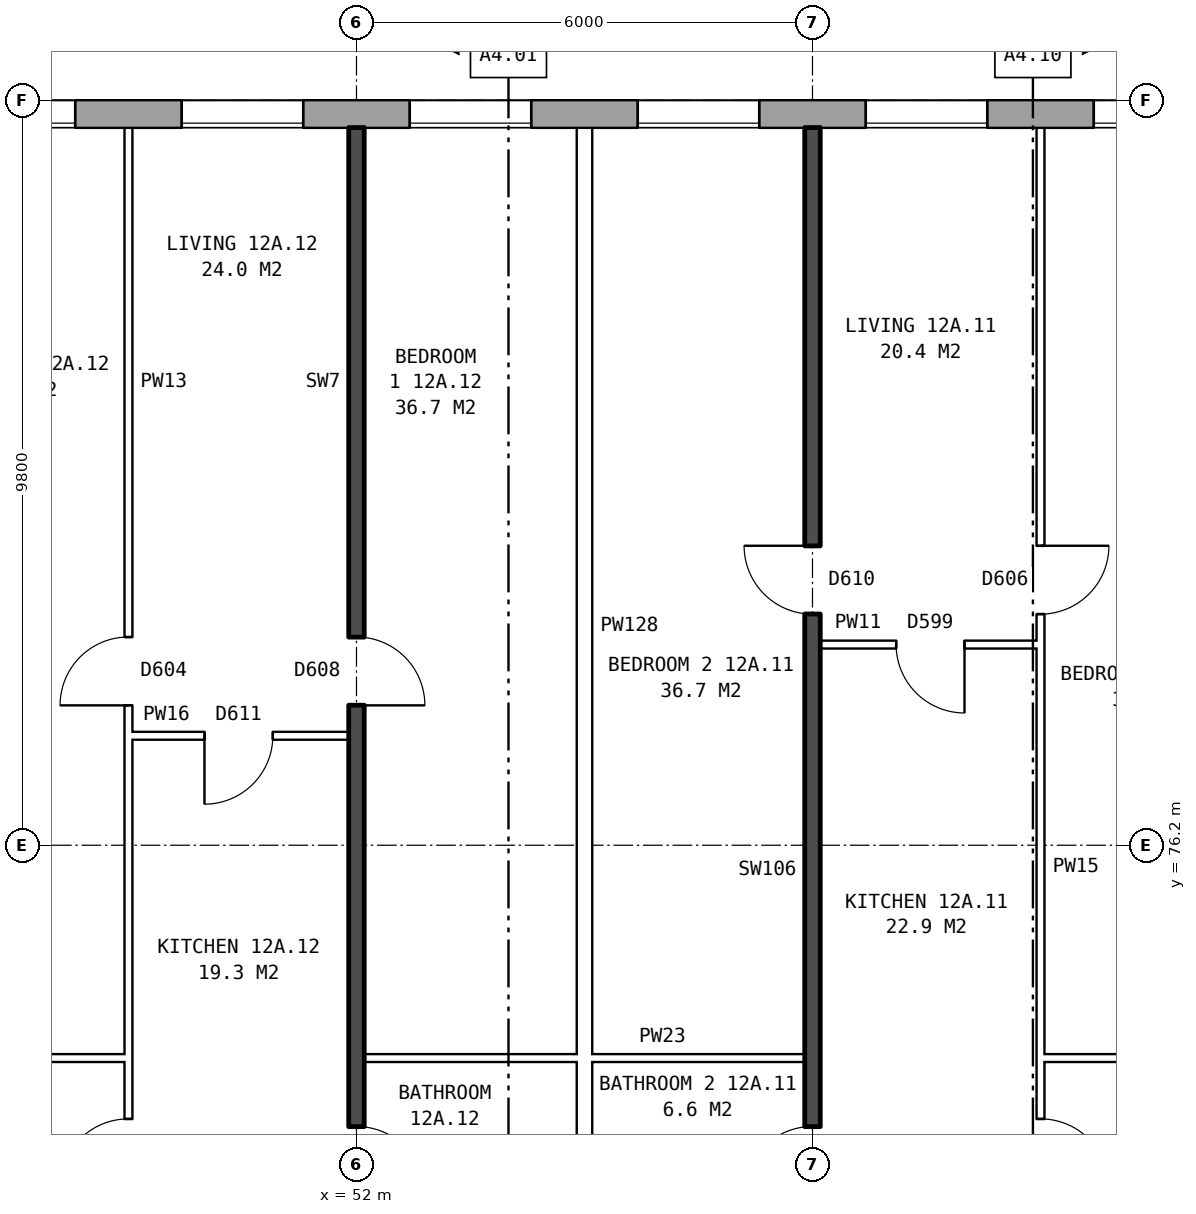
"""IFC4 building model, lengths in metres.
Left out: names, types, materials, properties, quantities, classifications, styles, units other than length and angle.
Written with IfcOpenShell. Run it as: python <this file> out.ifc"""

import sys

from ifc_helpers import new_model, si_unit, direction, frame, frame_2d, origin, place, context, subcontext, project, spatial, rectangle, extrude, element, fill, save


model = new_model("IFC4")
c1 = context("Model", 3, precision=1e-05, world=origin(), true_north=direction((0.0, 1.0)))
c2 = subcontext(c1, "Body", "Model", "MODEL_VIEW")
j1 = project(units=[si_unit("LENGTHUNIT", "METRE"), si_unit("PLANEANGLEUNIT", "RADIAN")], contexts=[c1])
p1 = place(None, origin())
s1 = spatial("IfcSite", under=j1, at=p1, CompositionType="ELEMENT")
p2 = place(p1, origin())
s2 = spatial("IfcBuilding", under=s1, at=p2, CompositionType="ELEMENT")
p3 = place(p2, frame((0.0, 0.0, 47.4)))
s3 = spatial("IfcBuildingStorey", under=s2, at=p3, CompositionType="ELEMENT", Elevation=47.4)
p4 = place(p3, frame((72.925, 85.82, 0.0), z_axis=(0.0, 0.0, 1.0), x_axis=(-1.0, 0.0, 0.0)))
e1 = element("IfcWall", 1, at=p4, inside=s3, PredefinedType="STANDARD", context=c2, shape_type="SweptSolid", body=[
    extrude(rectangle(XDim=48.351, YDim=0.36, at=frame_2d((24.175, 0.0))), origin(), (0.0, 0.0, 1.0), 2.85),
])
p5 = place(p4, frame((0.625, 0.0, 0.8)))
e2 = element("IfcOpeningElement", 2, at=p5, cuts=e1, PredefinedType="OPENING", context=c2, shape_type="SweptSolid", body=[
    extrude(rectangle(XDim=1.6, YDim=1.8, at=frame_2d((0.8, 0.9))), frame((0.0, 0.19, 0.0), z_axis=(0.0, -1.0, 0.0), x_axis=(1.0, 0.0, 0.0)), (0.0, 0.0, 1.0), 0.38),
])
p6 = place(p4, frame((3.125, 0.0, 1.7)))
e3 = element("IfcOpeningElement", 3, at=p6, cuts=e1, PredefinedType="OPENING", context=c2, shape_type="SweptSolid", body=[
    extrude(rectangle(XDim=0.6, YDim=0.9, at=frame_2d((0.3, 0.45))), frame((0.0, 0.19, 0.0), z_axis=(0.0, -1.0, 0.0), x_axis=(1.0, 0.0, 0.0)), (0.0, 0.0, 1.0), 0.38),
])
p7 = place(p4, frame((6.625, 0.0, 0.8)))
e4 = element("IfcOpeningElement", 4, at=p7, cuts=e1, PredefinedType="OPENING", context=c2, shape_type="SweptSolid", body=[
    extrude(rectangle(XDim=1.6, YDim=1.8, at=frame_2d((0.8, 0.9))), frame((0.0, 0.19, 0.0), z_axis=(0.0, -1.0, 0.0), x_axis=(1.0, 0.0, 0.0)), (0.0, 0.0, 1.0), 0.38),
])
p8 = place(p4, frame((9.625, 0.0, 0.8)))
e5 = element("IfcOpeningElement", 5, at=p8, cuts=e1, PredefinedType="OPENING", context=c2, shape_type="SweptSolid", body=[
    extrude(rectangle(XDim=1.6, YDim=1.8, at=frame_2d((0.8, 0.9))), frame((0.0, 0.19, 0.0), z_axis=(0.0, -1.0, 0.0), x_axis=(1.0, 0.0, 0.0)), (0.0, 0.0, 1.0), 0.38),
])
p9 = place(p4, frame((12.625, 0.0, 0.8)))
e6 = element("IfcOpeningElement", 6, at=p9, cuts=e1, PredefinedType="OPENING", context=c2, shape_type="SweptSolid", body=[
    extrude(rectangle(XDim=1.6, YDim=1.8, at=frame_2d((0.8, 0.9))), frame((0.0, 0.19, 0.0), z_axis=(0.0, -1.0, 0.0), x_axis=(1.0, 0.0, 0.0)), (0.0, 0.0, 1.0), 0.38),
])
p10 = place(p4, frame((15.625, 0.0, 0.8)))
e7 = element("IfcOpeningElement", 7, at=p10, cuts=e1, PredefinedType="OPENING", context=c2, shape_type="SweptSolid", body=[
    extrude(rectangle(XDim=1.6, YDim=1.8, at=frame_2d((0.8, 0.9))), frame((0.0, 0.19, 0.0), z_axis=(0.0, -1.0, 0.0), x_axis=(1.0, 0.0, 0.0)), (0.0, 0.0, 1.0), 0.38),
])
p11 = place(p4, frame((18.625, 0.0, 0.8)))
e8 = element("IfcOpeningElement", 8, at=p11, cuts=e1, PredefinedType="OPENING", context=c2, shape_type="SweptSolid", body=[
    extrude(rectangle(XDim=1.6, YDim=1.8, at=frame_2d((0.8, 0.9))), frame((0.0, 0.19, 0.0), z_axis=(0.0, -1.0, 0.0), x_axis=(1.0, 0.0, 0.0)), (0.0, 0.0, 1.0), 0.38),
])
p12 = place(p4, frame((21.625, 0.0, 0.8)))
e9 = element("IfcOpeningElement", 9, at=p12, cuts=e1, PredefinedType="OPENING", context=c2, shape_type="SweptSolid", body=[
    extrude(rectangle(XDim=1.6, YDim=1.8, at=frame_2d((0.8, 0.9))), frame((0.0, 0.19, 0.0), z_axis=(0.0, -1.0, 0.0), x_axis=(1.0, 0.0, 0.0)), (0.0, 0.0, 1.0), 0.38),
])
p13 = place(p4, frame((24.625, 0.0, 0.8)))
e10 = element("IfcOpeningElement", 10, at=p13, cuts=e1, PredefinedType="OPENING", context=c2, shape_type="SweptSolid", body=[
    extrude(rectangle(XDim=1.6, YDim=1.8, at=frame_2d((0.8, 0.9))), frame((0.0, 0.19, 0.0), z_axis=(0.0, -1.0, 0.0), x_axis=(1.0, 0.0, 0.0)), (0.0, 0.0, 1.0), 0.38),
])
p14 = place(p4, frame((27.625, 0.0, 0.8)))
e11 = element("IfcOpeningElement", 11, at=p14, cuts=e1, PredefinedType="OPENING", context=c2, shape_type="SweptSolid", body=[
    extrude(rectangle(XDim=1.6, YDim=1.8, at=frame_2d((0.8, 0.9))), frame((0.0, 0.19, 0.0), z_axis=(0.0, -1.0, 0.0), x_axis=(1.0, 0.0, 0.0)), (0.0, 0.0, 1.0), 0.38),
])
p15 = place(p4, frame((30.625, 0.0, 0.8)))
e12 = element("IfcOpeningElement", 12, at=p15, cuts=e1, PredefinedType="OPENING", context=c2, shape_type="SweptSolid", body=[
    extrude(rectangle(XDim=1.6, YDim=1.8, at=frame_2d((0.8, 0.9))), frame((0.0, 0.19, 0.0), z_axis=(0.0, -1.0, 0.0), x_axis=(1.0, 0.0, 0.0)), (0.0, 0.0, 1.0), 0.38),
])
p16 = place(p4, frame((33.625, 0.0, 0.8)))
e13 = element("IfcOpeningElement", 13, at=p16, cuts=e1, PredefinedType="OPENING", context=c2, shape_type="SweptSolid", body=[
    extrude(rectangle(XDim=1.6, YDim=1.8, at=frame_2d((0.8, 0.9))), frame((0.0, 0.19, 0.0), z_axis=(0.0, -1.0, 0.0), x_axis=(1.0, 0.0, 0.0)), (0.0, 0.0, 1.0), 0.38),
])
p17 = place(p4, frame((36.625, 0.0, 0.8)))
e14 = element("IfcOpeningElement", 14, at=p17, cuts=e1, PredefinedType="OPENING", context=c2, shape_type="SweptSolid", body=[
    extrude(rectangle(XDim=1.6, YDim=1.8, at=frame_2d((0.8, 0.9))), frame((0.0, 0.19, 0.0), z_axis=(0.0, -1.0, 0.0), x_axis=(1.0, 0.0, 0.0)), (0.0, 0.0, 1.0), 0.38),
])
p18 = place(p4, frame((39.625, 0.0, 0.8)))
e15 = element("IfcOpeningElement", 15, at=p18, cuts=e1, PredefinedType="OPENING", context=c2, shape_type="SweptSolid", body=[
    extrude(rectangle(XDim=1.6, YDim=1.8, at=frame_2d((0.8, 0.9))), frame((0.0, 0.19, 0.0), z_axis=(0.0, -1.0, 0.0), x_axis=(1.0, 0.0, 0.0)), (0.0, 0.0, 1.0), 0.38),
])
p19 = place(p4, frame((41.525, 0.0, 0.8)))
e16 = element("IfcOpeningElement", 16, at=p19, cuts=e1, PredefinedType="OPENING", context=c2, shape_type="SweptSolid", body=[
    extrude(rectangle(XDim=1.2, YDim=1.2, at=frame_2d((0.6, 0.6))), frame((0.0, 0.19, 0.0), z_axis=(0.0, -1.0, 0.0), x_axis=(1.0, 0.0, 0.0)), (0.0, 0.0, 1.0), 0.38),
])
p20 = place(p4, frame((45.625, 0.0, 0.8)))
e17 = element("IfcOpeningElement", 17, at=p20, cuts=e1, PredefinedType="OPENING", context=c2, shape_type="SweptSolid", body=[
    extrude(rectangle(XDim=1.6, YDim=1.8, at=frame_2d((0.8, 0.9))), frame((0.0, 0.19, 0.0), z_axis=(0.0, -1.0, 0.0), x_axis=(1.0, 0.0, 0.0)), (0.0, 0.0, 1.0), 0.38),
])
p21 = place(p4, frame((5.225, 0.0, 0.8)))
e18 = element("IfcOpeningElement", 18, at=p21, cuts=e1, PredefinedType="OPENING", context=c2, shape_type="SweptSolid", body=[
    extrude(rectangle(XDim=1.0, YDim=0.9, at=frame_2d((0.5, 0.45))), frame((0.0, 0.19, 0.0), z_axis=(0.0, -1.0, 0.0), x_axis=(1.0, 0.0, 0.0)), (0.0, 0.0, 1.0), 0.38),
])
p22 = place(p3, frame((46.1, 73.4, 0.0), z_axis=(0.0, 0.0, 1.0), x_axis=(1.0, 0.0, 0.0)))
e19 = element("IfcWall", 19, at=p22, inside=s3, PredefinedType="PARTITIONING", context=c2, shape_type="SweptSolid", body=[
    extrude(rectangle(XDim=2.9, YDim=0.1, at=frame_2d((1.45, 0.0))), origin(), (0.0, 0.0, 1.0), 2.85),
])
p23 = place(p3, frame((52.1, 73.4, 0.0), z_axis=(0.0, 0.0, 1.0), x_axis=(1.0, 0.0, 0.0)))
e20 = element("IfcWall", 20, at=p23, inside=s3, PredefinedType="PARTITIONING", context=c2, shape_type="SweptSolid", body=[
    extrude(rectangle(XDim=5.8, YDim=0.1, at=frame_2d((2.9, 0.0))), origin(), (0.0, 0.0, 1.0), 2.85),
])
p24 = place(p3, frame((61.0, 73.4, 0.0), z_axis=(0.0, 0.0, 1.0), x_axis=(1.0, 0.0, 0.0)))
e21 = element("IfcWall", 21, at=p24, inside=s3, PredefinedType="PARTITIONING", context=c2, shape_type="SweptSolid", body=[
    extrude(rectangle(XDim=2.64, YDim=0.1, at=frame_2d((1.32, 0.0))), origin(), (0.0, 0.0, 1.0), 2.85),
])
p25 = place(p3, frame((49.0, 77.64, 0.0), z_axis=(0.0, 0.0, 1.0), x_axis=(1.0, 0.0, 0.0)))
e22 = element("IfcWall", 22, at=p25, inside=s3, PredefinedType="PARTITIONING", context=c2, shape_type="SweptSolid", body=[
    extrude(rectangle(XDim=2.9, YDim=0.1, at=frame_2d((1.45, 0.0))), origin(), (0.0, 0.0, 1.0), 2.85),
])
p26 = place(p25, frame((1.0, 0.0, 0.0)))
e23 = element("IfcOpeningElement", 23, at=p26, cuts=e22, PredefinedType="OPENING", context=c2, shape_type="SweptSolid", body=[
    extrude(rectangle(XDim=0.9, YDim=2.1, at=frame_2d((0.45, 1.05))), frame((0.0, 0.06, 0.0), z_axis=(0.0, -1.0, 0.0), x_axis=(1.0, 0.0, 0.0)), (0.0, 0.0, 1.0), 0.12),
])
p27 = place(p3, frame((58.1, 78.84, 0.0), z_axis=(0.0, 0.0, 1.0), x_axis=(1.0, 0.0, 0.0)))
e24 = element("IfcWall", 24, at=p27, inside=s3, PredefinedType="PARTITIONING", context=c2, shape_type="SweptSolid", body=[
    extrude(rectangle(XDim=2.9, YDim=0.1, at=frame_2d((1.45, 0.0))), origin(), (0.0, 0.0, 1.0), 2.85),
])
p28 = place(p27, frame((1.0, 0.0, 0.0)))
e25 = element("IfcOpeningElement", 25, at=p28, cuts=e24, PredefinedType="OPENING", context=c2, shape_type="SweptSolid", body=[
    extrude(rectangle(XDim=0.9, YDim=2.1, at=frame_2d((0.45, 1.05))), frame((0.0, 0.06, 0.0), z_axis=(0.0, -1.0, 0.0), x_axis=(1.0, 0.0, 0.0)), (0.0, 0.0, 1.0), 0.12),
])
p29 = place(p3, frame((49.0, 71.3, 0.0), z_axis=(0.0, 0.0, 1.0), x_axis=(0.0, 1.0, 0.0)))
e26 = element("IfcWall", 26, at=p29, inside=s3, PredefinedType="PARTITIONING", context=c2, shape_type="SweptSolid", body=[
    extrude(rectangle(XDim=14.34, YDim=0.1, at=frame_2d((7.17, 0.0))), origin(), (0.0, 0.0, 1.0), 2.85),
])
p30 = place(p29, frame((6.74, 0.0, 0.0)))
e27 = element("IfcOpeningElement", 27, at=p30, cuts=e26, PredefinedType="OPENING", context=c2, shape_type="SweptSolid", body=[
    extrude(rectangle(XDim=0.9, YDim=2.1, at=frame_2d((0.45, 1.05))), frame((0.0, 0.06, 0.0), z_axis=(0.0, -1.0, 0.0), x_axis=(1.0, 0.0, 0.0)), (0.0, 0.0, 1.0), 0.12),
])
p31 = place(p29, frame((0.4, 0.0, 0.0)))
e28 = element("IfcOpeningElement", 28, at=p31, cuts=e26, PredefinedType="OPENING", context=c2, shape_type="SweptSolid", body=[
    extrude(rectangle(XDim=0.9, YDim=2.1, at=frame_2d((0.45, 1.05))), frame((0.0, 0.06, 0.0), z_axis=(0.0, -1.0, 0.0), x_axis=(1.0, 0.0, 0.0)), (0.0, 0.0, 1.0), 0.12),
])
p32 = place(p3, frame((52.0, 71.2, 0.0), z_axis=(0.0, 0.0, 1.0), x_axis=(0.0, 1.0, 0.0)))
e29 = element("IfcWall", 29, at=p32, inside=s3, PredefinedType="SOLIDWALL", context=c2, shape_type="SweptSolid", body=[
    extrude(rectangle(XDim=14.44, YDim=0.2, at=frame_2d((7.22, 0.0))), origin(), (0.0, 0.0, 1.0), 2.85),
])
p33 = place(p32, frame((6.84, 0.0, 0.0)))
e30 = element("IfcOpeningElement", 30, at=p33, cuts=e29, PredefinedType="OPENING", context=c2, shape_type="SweptSolid", body=[
    extrude(rectangle(XDim=0.9, YDim=2.1, at=frame_2d((0.45, 1.05))), frame((0.0, 0.11, 0.0), z_axis=(0.0, -1.0, 0.0), x_axis=(1.0, 0.0, 0.0)), (0.0, 0.0, 1.0), 0.22),
])
p34 = place(p32, frame((0.4, 0.0, 0.0)))
e31 = element("IfcOpeningElement", 31, at=p34, cuts=e29, PredefinedType="OPENING", context=c2, shape_type="SweptSolid", body=[
    extrude(rectangle(XDim=0.9, YDim=2.1, at=frame_2d((0.45, 1.05))), frame((0.0, 0.11, 0.0), z_axis=(0.0, -1.0, 0.0), x_axis=(1.0, 0.0, 0.0)), (0.0, 0.0, 1.0), 0.22),
])
p35 = place(p3, frame((55.0, 71.3, 0.0), z_axis=(0.0, 0.0, 1.0), x_axis=(0.0, 1.0, 0.0)))
e32 = element("IfcWall", 32, at=p35, inside=s3, PredefinedType="PARTITIONING", context=c2, shape_type="SweptSolid", body=[
    extrude(rectangle(XDim=14.34, YDim=0.2, at=frame_2d((7.17, 0.0))), origin(), (0.0, 0.0, 1.0), 2.85),
])
p36 = place(p3, frame((58.0, 71.2, 0.0), z_axis=(0.0, 0.0, 1.0), x_axis=(0.0, 1.0, 0.0)))
e33 = element("IfcWall", 33, at=p36, inside=s3, PredefinedType="SOLIDWALL", context=c2, shape_type="SweptSolid", body=[
    extrude(rectangle(XDim=14.44, YDim=0.2, at=frame_2d((7.22, 0.0))), origin(), (0.0, 0.0, 1.0), 2.85),
])
p37 = place(p36, frame((8.04, 0.0, 0.0)))
e34 = element("IfcOpeningElement", 34, at=p37, cuts=e33, PredefinedType="OPENING", context=c2, shape_type="SweptSolid", body=[
    extrude(rectangle(XDim=0.9, YDim=2.1, at=frame_2d((0.45, 1.05))), frame((0.0, 0.11, 0.0), z_axis=(0.0, -1.0, 0.0), x_axis=(1.0, 0.0, 0.0)), (0.0, 0.0, 1.0), 0.22),
])
p38 = place(p36, frame((0.4, 0.0, 0.0)))
e35 = element("IfcOpeningElement", 35, at=p38, cuts=e33, PredefinedType="OPENING", context=c2, shape_type="SweptSolid", body=[
    extrude(rectangle(XDim=0.9, YDim=2.1, at=frame_2d((0.45, 1.05))), frame((0.0, 0.11, 0.0), z_axis=(0.0, -1.0, 0.0), x_axis=(1.0, 0.0, 0.0)), (0.0, 0.0, 1.0), 0.22),
])
p39 = place(p3, frame((61.0, 71.3, 0.0), z_axis=(0.0, 0.0, 1.0), x_axis=(0.0, 1.0, 0.0)))
e36 = element("IfcWall", 36, at=p39, inside=s3, PredefinedType="PARTITIONING", context=c2, shape_type="SweptSolid", body=[
    extrude(rectangle(XDim=14.34, YDim=0.1, at=frame_2d((7.17, 0.0))), origin(), (0.0, 0.0, 1.0), 2.85),
])
p40 = place(p39, frame((7.94, 0.0, 0.0)))
e37 = element("IfcOpeningElement", 37, at=p40, cuts=e36, PredefinedType="OPENING", context=c2, shape_type="SweptSolid", body=[
    extrude(rectangle(XDim=0.9, YDim=2.1, at=frame_2d((0.45, 1.05))), frame((0.0, 0.06, 0.0), z_axis=(0.0, -1.0, 0.0), x_axis=(1.0, 0.0, 0.0)), (0.0, 0.0, 1.0), 0.12),
])
p41 = place(p39, frame((0.4, 0.0, 0.0)))
e38 = element("IfcOpeningElement", 38, at=p41, cuts=e36, PredefinedType="OPENING", context=c2, shape_type="SweptSolid", body=[
    extrude(rectangle(XDim=0.9, YDim=2.1, at=frame_2d((0.45, 1.05))), frame((0.0, 0.06, 0.0), z_axis=(0.0, -1.0, 0.0), x_axis=(1.0, 0.0, 0.0)), (0.0, 0.0, 1.0), 0.12),
])
p42 = place(p8, origin())
e39 = element("IfcWindow", 39, at=p42, inside=s3, PartitioningType="SINGLE_PANEL", PredefinedType="WINDOW", context=c2, shape_type="SweptSolid", body=[
    extrude(rectangle(XDim=1.6, YDim=1.8, at=frame_2d((0.8, 0.9))), frame((0.0, 0.15, 0.0), z_axis=(0.0, -1.0, 0.0), x_axis=(1.0, 0.0, 0.0)), (0.0, 0.0, 1.0), 0.06),
])
fill(e5, e39)
p43 = place(p9, origin())
e40 = element("IfcWindow", 40, at=p43, inside=s3, PartitioningType="SINGLE_PANEL", PredefinedType="WINDOW", context=c2, shape_type="SweptSolid", body=[
    extrude(rectangle(XDim=1.6, YDim=1.8, at=frame_2d((0.8, 0.9))), frame((0.0, 0.15, 0.0), z_axis=(0.0, -1.0, 0.0), x_axis=(1.0, 0.0, 0.0)), (0.0, 0.0, 1.0), 0.06),
])
fill(e6, e40)
p44 = place(p10, origin())
e41 = element("IfcWindow", 41, at=p44, inside=s3, PartitioningType="SINGLE_PANEL", PredefinedType="WINDOW", context=c2, shape_type="SweptSolid", body=[
    extrude(rectangle(XDim=1.6, YDim=1.8, at=frame_2d((0.8, 0.9))), frame((0.0, 0.15, 0.0), z_axis=(0.0, -1.0, 0.0), x_axis=(1.0, 0.0, 0.0)), (0.0, 0.0, 1.0), 0.06),
])
fill(e7, e41)
p45 = place(p11, origin())
e42 = element("IfcWindow", 42, at=p45, inside=s3, PartitioningType="SINGLE_PANEL", PredefinedType="WINDOW", context=c2, shape_type="SweptSolid", body=[
    extrude(rectangle(XDim=1.6, YDim=1.8, at=frame_2d((0.8, 0.9))), frame((0.0, 0.15, 0.0), z_axis=(0.0, -1.0, 0.0), x_axis=(1.0, 0.0, 0.0)), (0.0, 0.0, 1.0), 0.06),
])
fill(e8, e42)
p46 = place(p12, origin())
e43 = element("IfcWindow", 43, at=p46, inside=s3, PartitioningType="SINGLE_PANEL", PredefinedType="WINDOW", context=c2, shape_type="SweptSolid", body=[
    extrude(rectangle(XDim=1.6, YDim=1.8, at=frame_2d((0.8, 0.9))), frame((0.0, 0.15, 0.0), z_axis=(0.0, -1.0, 0.0), x_axis=(1.0, 0.0, 0.0)), (0.0, 0.0, 1.0), 0.06),
])
fill(e9, e43)
p47 = place(p13, origin())
e44 = element("IfcWindow", 44, at=p47, inside=s3, PartitioningType="SINGLE_PANEL", PredefinedType="WINDOW", context=c2, shape_type="SweptSolid", body=[
    extrude(rectangle(XDim=1.6, YDim=1.8, at=frame_2d((0.8, 0.9))), frame((0.0, 0.15, 0.0), z_axis=(0.0, -1.0, 0.0), x_axis=(1.0, 0.0, 0.0)), (0.0, 0.0, 1.0), 0.06),
])
fill(e10, e44)
p48 = place(p40, frame((0.9, 0.0, 0.0), z_axis=(0.0, 0.0, 1.0), x_axis=(-1.0, 0.0, 0.0)))
e45 = element("IfcDoor", 45, at=p48, inside=s3, OperationType="SINGLE_SWING_LEFT", PredefinedType="DOOR", context=c2, shape_type="SweptSolid", body=[
    extrude(rectangle(XDim=0.9, YDim=2.1, at=frame_2d((0.45, 1.05))), frame((0.0, 0.025, 0.0), z_axis=(0.0, -1.0, 0.0), x_axis=(1.0, 0.0, 0.0)), (0.0, 0.0, 1.0), 0.05),
])
fill(e37, e45)
p49 = place(p37, origin())
e46 = element("IfcDoor", 46, at=p49, inside=s3, OperationType="SINGLE_SWING_RIGHT", PredefinedType="DOOR", context=c2, shape_type="SweptSolid", body=[
    extrude(rectangle(XDim=0.9, YDim=2.1, at=frame_2d((0.45, 1.05))), frame((0.0, 0.025, 0.0), z_axis=(0.0, -1.0, 0.0), x_axis=(1.0, 0.0, 0.0)), (0.0, 0.0, 1.0), 0.05),
])
fill(e34, e46)
p50 = place(p28, frame((0.9, 0.0, 0.0), z_axis=(0.0, 0.0, 1.0), x_axis=(-1.0, 0.0, 0.0)))
e47 = element("IfcDoor", 47, at=p50, inside=s3, OperationType="SINGLE_SWING_LEFT", PredefinedType="DOOR", context=c2, shape_type="SweptSolid", body=[
    extrude(rectangle(XDim=0.9, YDim=2.1, at=frame_2d((0.45, 1.05))), frame((0.0, 0.025, 0.0), z_axis=(0.0, -1.0, 0.0), x_axis=(1.0, 0.0, 0.0)), (0.0, 0.0, 1.0), 0.05),
])
fill(e25, e47)
p51 = place(p41, frame((0.9, 0.0, 0.0), z_axis=(0.0, 0.0, 1.0), x_axis=(-1.0, 0.0, 0.0)))
e48 = element("IfcDoor", 48, at=p51, inside=s3, OperationType="SINGLE_SWING_RIGHT", PredefinedType="DOOR", context=c2, shape_type="SweptSolid", body=[
    extrude(rectangle(XDim=0.9, YDim=2.1, at=frame_2d((0.45, 1.05))), frame((0.0, 0.025, 0.0), z_axis=(0.0, -1.0, 0.0), x_axis=(1.0, 0.0, 0.0)), (0.0, 0.0, 1.0), 0.05),
])
fill(e38, e48)
p52 = place(p38, origin())
e49 = element("IfcDoor", 49, at=p52, inside=s3, OperationType="SINGLE_SWING_LEFT", PredefinedType="DOOR", context=c2, shape_type="SweptSolid", body=[
    extrude(rectangle(XDim=0.9, YDim=2.1, at=frame_2d((0.45, 1.05))), frame((0.0, 0.025, 0.0), z_axis=(0.0, -1.0, 0.0), x_axis=(1.0, 0.0, 0.0)), (0.0, 0.0, 1.0), 0.05),
])
fill(e35, e49)
p53 = place(p33, frame((0.9, 0.0, 0.0), z_axis=(0.0, 0.0, 1.0), x_axis=(-1.0, 0.0, 0.0)))
e50 = element("IfcDoor", 50, at=p53, inside=s3, OperationType="SINGLE_SWING_RIGHT", PredefinedType="DOOR", context=c2, shape_type="SweptSolid", body=[
    extrude(rectangle(XDim=0.9, YDim=2.1, at=frame_2d((0.45, 1.05))), frame((0.0, 0.025, 0.0), z_axis=(0.0, -1.0, 0.0), x_axis=(1.0, 0.0, 0.0)), (0.0, 0.0, 1.0), 0.05),
])
fill(e30, e50)
p54 = place(p30, origin())
e51 = element("IfcDoor", 51, at=p54, inside=s3, OperationType="SINGLE_SWING_LEFT", PredefinedType="DOOR", context=c2, shape_type="SweptSolid", body=[
    extrude(rectangle(XDim=0.9, YDim=2.1, at=frame_2d((0.45, 1.05))), frame((0.0, 0.025, 0.0), z_axis=(0.0, -1.0, 0.0), x_axis=(1.0, 0.0, 0.0)), (0.0, 0.0, 1.0), 0.05),
])
fill(e27, e51)
p55 = place(p26, frame((0.9, 0.0, 0.0), z_axis=(0.0, 0.0, 1.0), x_axis=(-1.0, 0.0, 0.0)))
e52 = element("IfcDoor", 52, at=p55, inside=s3, OperationType="SINGLE_SWING_RIGHT", PredefinedType="DOOR", context=c2, shape_type="SweptSolid", body=[
    extrude(rectangle(XDim=0.9, YDim=2.1, at=frame_2d((0.45, 1.05))), frame((0.0, 0.025, 0.0), z_axis=(0.0, -1.0, 0.0), x_axis=(1.0, 0.0, 0.0)), (0.0, 0.0, 1.0), 0.05),
])
fill(e23, e52)
p56 = place(p34, frame((0.9, 0.0, 0.0), z_axis=(0.0, 0.0, 1.0), x_axis=(-1.0, 0.0, 0.0)))
e53 = element("IfcDoor", 53, at=p56, inside=s3, OperationType="SINGLE_SWING_RIGHT", PredefinedType="DOOR", context=c2, shape_type="SweptSolid", body=[
    extrude(rectangle(XDim=0.9, YDim=2.1, at=frame_2d((0.45, 1.05))), frame((0.0, 0.025, 0.0), z_axis=(0.0, -1.0, 0.0), x_axis=(1.0, 0.0, 0.0)), (0.0, 0.0, 1.0), 0.05),
])
fill(e31, e53)
p57 = place(p31, origin())
e54 = element("IfcDoor", 54, at=p57, inside=s3, OperationType="SINGLE_SWING_LEFT", PredefinedType="DOOR", context=c2, shape_type="SweptSolid", body=[
    extrude(rectangle(XDim=0.9, YDim=2.1, at=frame_2d((0.45, 1.05))), frame((0.0, 0.025, 0.0), z_axis=(0.0, -1.0, 0.0), x_axis=(1.0, 0.0, 0.0)), (0.0, 0.0, 1.0), 0.05),
])
fill(e28, e54)
save(model, sys.argv[1])
